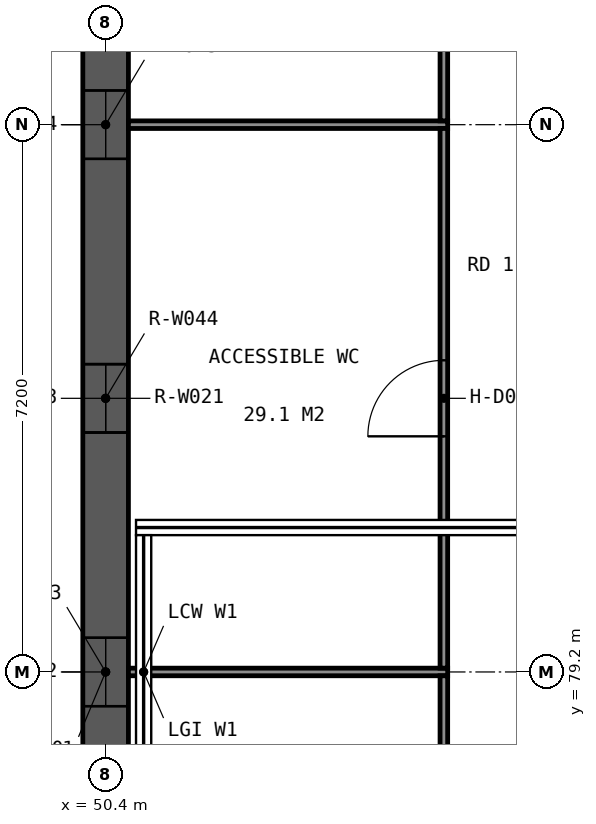
"""IFC4 building model, lengths in metres.
Left out: names, types, materials, properties, quantities, classifications, styles, units other than length and angle.
Written with IfcOpenShell. Run it as: python <this file> out.ifc"""

import sys

from ifc_helpers import new_model, si_unit, direction, frame, frame_2d, origin, place, context, subcontext, project, spatial, polyline, rectangle, outline, extrude, element, fill, save


model = new_model("IFC4")
c1 = context("Model", 3, precision=1e-05, world=origin(), true_north=direction((0.0, 1.0)))
c2 = subcontext(c1, "Body", "Model", "MODEL_VIEW")
j1 = project(units=[si_unit("LENGTHUNIT", "METRE"), si_unit("PLANEANGLEUNIT", "RADIAN")], contexts=[c1])
p1 = place(None, origin())
s1 = spatial("IfcSite", under=j1, at=p1, CompositionType="ELEMENT")
p2 = place(p1, origin())
s2 = spatial("IfcBuilding", under=s1, at=p2, CompositionType="ELEMENT")
p3 = place(p2, frame((0.0, 0.0, 9.6)))
s3 = spatial("IfcBuildingStorey", under=s2, at=p3, CompositionType="ELEMENT", Elevation=9.6)
p4 = place(p3, frame((50.4, 52.2, 0.0), z_axis=(0.0, 0.0, 1.0), x_axis=(0.0, 1.0, 0.0)))
e1 = element("IfcWall", 1, at=p4, inside=s3, PredefinedType="SOLIDWALL", context=c2, shape_type="SweptSolid", body=[
    extrude(outline(polyline([(0.0, 0.0), (54.0, 0.0), (54.0, 6.409), (53.7, 6.509), (53.4, 6.609), (53.1, 6.709), (52.8, 6.809), (52.5, 6.909), (52.2, 7.009), (51.9, 7.109), (51.6, 7.209), (51.3, 7.309), (51.0, 7.409), (50.764, 7.488), (50.762, 7.489), (50.7, 7.509), (50.4, 7.609), (50.1, 7.709), (49.8, 7.809), (49.5, 7.909), (49.2, 8.009), (48.9, 8.109), (48.6, 8.209), (48.3, 8.309), (48.0, 8.409), (47.7, 8.509), (47.4, 8.609), (47.1, 8.709), (46.8, 8.809), (46.5, 8.909), (46.2, 9.009), (46.027, 9.067), (46.025, 9.068), (45.964, 9.088), (45.962, 9.3), (45.9, 9.32), (45.6, 9.42), (45.3, 9.52), (45.0, 9.62), (44.7, 9.72), (44.4, 9.82), (44.1, 9.92), (43.8, 10.02), (43.5, 10.12), (43.2, 10.22), (42.9, 10.32), (42.6, 10.42), (42.3, 10.52), (42.0, 10.62), (41.7, 10.72), (41.4, 10.82), (41.227, 10.878), (41.225, 10.878), (41.1, 10.92), (40.8, 11.02), (40.5, 11.12), (40.2, 11.22), (39.9, 11.32), (39.6, 11.42), (39.3, 11.52), (39.0, 11.62), (38.7, 11.72), (38.4, 11.82), (38.1, 11.92), (37.8, 12.02), (37.5, 12.12), (37.2, 12.22), (36.9, 12.32), (36.6, 12.42), (36.49, 12.457), (36.488, 12.458), (36.427, 12.478), (36.425, 12.689), (36.3, 12.731), (36.0, 12.831), (35.7, 12.931), (35.4, 13.031), (35.1, 13.131), (34.8, 13.231), (34.5, 13.331), (34.2, 13.431), (33.9, 13.531), (33.6, 13.631), (33.3, 13.731), (33.0, 13.831), (32.7, 13.931), (32.4, 14.031), (32.1, 14.131), (31.8, 14.231), (31.69, 14.268), (31.688, 14.268), (31.5, 14.331), (31.2, 14.431), (30.9, 14.531), (30.6, 14.631), (30.3, 14.731), (30.0, 14.831), (29.7, 14.931), (29.4, 15.031), (29.1, 15.131), (28.8, 15.231), (28.5, 15.331), (28.2, 15.431), (27.9, 15.531), (27.6, 15.631), (27.3, 15.731), (27.201, 15.764), (27.199, 15.764), (27.0, 15.764), (26.801, 15.764), (26.799, 15.764), (26.7, 15.731), (26.4, 15.631), (26.1, 15.531), (25.8, 15.431), (25.5, 15.331), (25.2, 15.231), (24.9, 15.131), (24.6, 15.031), (24.3, 14.931), (24.0, 14.831), (23.7, 14.731), (23.4, 14.631), (23.1, 14.531), (22.8, 14.431), (22.5, 14.331), (22.312, 14.268), (22.31, 14.268), (22.2, 14.231), (21.9, 14.131), (21.6, 14.031), (21.3, 13.931), (21.0, 13.831), (20.7, 13.731), (20.4, 13.631), (20.1, 13.531), (19.8, 13.431), (19.5, 13.331), (19.2, 13.231), (18.9, 13.131), (18.6, 13.031), (18.3, 12.931), (18.0, 12.831), (17.7, 12.731), (17.575, 12.689), (17.573, 12.478), (17.512, 12.458), (17.51, 12.457), (17.4, 12.42), (17.1, 12.32), (16.8, 12.22), (16.5, 12.12), (16.2, 12.02), (15.9, 11.92), (15.6, 11.82), (15.3, 11.72), (15.0, 11.62), (14.7, 11.52), (14.4, 11.42), (14.1, 11.32), (13.8, 11.22), (13.5, 11.12), (13.2, 11.02), (12.9, 10.92), (12.775, 10.878), (12.773, 10.878), (12.6, 10.82), (12.3, 10.72), (12.0, 10.62), (11.7, 10.52), (11.4, 10.42), (11.1, 10.32), (10.8, 10.22), (10.5, 10.12), (10.2, 10.02), (9.9, 9.92), (9.6, 9.82), (9.3, 9.72), (9.0, 9.62), (8.7, 9.52), (8.4, 9.42), (8.1, 9.32), (8.038, 9.3), (8.036, 9.088), (7.975, 9.068), (7.973, 9.067), (7.8, 9.009), (7.5, 8.909), (7.2, 8.809), (6.9, 8.709), (6.6, 8.609), (6.3, 8.509), (6.0, 8.409), (5.7, 8.309), (5.4, 8.209), (5.1, 8.109), (4.8, 8.009), (4.5, 7.909), (4.2, 7.809), (3.9, 7.709), (3.6, 7.609), (3.3, 7.509), (3.238, 7.489), (3.236, 7.488), (3.0, 7.409), (2.7, 7.309), (2.4, 7.209), (2.1, 7.109), (1.8, 7.009), (1.5, 6.909), (1.2, 6.809), (0.9, 6.709), (0.6, 6.609), (0.3, 6.509), (0.0, 6.409), (0.0, 0.0)])), frame((0.0, 0.3, 0.0), z_axis=(0.0, -1.0, 0.0), x_axis=(1.0, 0.0, 0.0)), (0.0, 0.0, 1.0), 0.6),
])
p5 = place(p4, frame((1.35, 0.0, 0.9)))
e2 = element("IfcOpeningElement", 2, at=p5, cuts=e1, PredefinedType="OPENING", context=c2, shape_type="SweptSolid", body=[
    extrude(rectangle(XDim=0.9, YDim=3.3, at=frame_2d((0.45, 1.65))), frame((0.0, 0.31, 0.0), z_axis=(0.0, -1.0, 0.0), x_axis=(1.0, 0.0, 0.0)), (0.0, 0.0, 1.0), 0.62),
])
p6 = place(p4, frame((8.55, 0.0, 0.9)))
e3 = element("IfcOpeningElement", 3, at=p6, cuts=e1, PredefinedType="OPENING", context=c2, shape_type="SweptSolid", body=[
    extrude(rectangle(XDim=0.9, YDim=3.3, at=frame_2d((0.45, 1.65))), frame((0.0, 0.31, 0.0), z_axis=(0.0, -1.0, 0.0), x_axis=(1.0, 0.0, 0.0)), (0.0, 0.0, 1.0), 0.62),
])
p7 = place(p4, frame((15.75, 0.0, 0.9)))
e4 = element("IfcOpeningElement", 4, at=p7, cuts=e1, PredefinedType="OPENING", context=c2, shape_type="SweptSolid", body=[
    extrude(rectangle(XDim=0.9, YDim=3.3, at=frame_2d((0.45, 1.65))), frame((0.0, 0.31, 0.0), z_axis=(0.0, -1.0, 0.0), x_axis=(1.0, 0.0, 0.0)), (0.0, 0.0, 1.0), 0.62),
])
p8 = place(p4, frame((22.95, 0.0, 0.9)))
e5 = element("IfcOpeningElement", 5, at=p8, cuts=e1, PredefinedType="OPENING", context=c2, shape_type="SweptSolid", body=[
    extrude(rectangle(XDim=0.9, YDim=3.3, at=frame_2d((0.45, 1.65))), frame((0.0, 0.31, 0.0), z_axis=(0.0, -1.0, 0.0), x_axis=(1.0, 0.0, 0.0)), (0.0, 0.0, 1.0), 0.62),
])
p9 = place(p4, frame((30.15, 0.0, 0.9)))
e6 = element("IfcOpeningElement", 6, at=p9, cuts=e1, PredefinedType="OPENING", context=c2, shape_type="SweptSolid", body=[
    extrude(rectangle(XDim=0.9, YDim=3.3, at=frame_2d((0.45, 1.65))), frame((0.0, 0.31, 0.0), z_axis=(0.0, -1.0, 0.0), x_axis=(1.0, 0.0, 0.0)), (0.0, 0.0, 1.0), 0.62),
])
p10 = place(p4, frame((37.35, 0.0, 0.9)))
e7 = element("IfcOpeningElement", 7, at=p10, cuts=e1, PredefinedType="OPENING", context=c2, shape_type="SweptSolid", body=[
    extrude(rectangle(XDim=0.9, YDim=3.3, at=frame_2d((0.45, 1.65))), frame((0.0, 0.31, 0.0), z_axis=(0.0, -1.0, 0.0), x_axis=(1.0, 0.0, 0.0)), (0.0, 0.0, 1.0), 0.62),
])
p11 = place(p4, frame((44.55, 0.0, 0.9)))
e8 = element("IfcOpeningElement", 8, at=p11, cuts=e1, PredefinedType="OPENING", context=c2, shape_type="SweptSolid", body=[
    extrude(rectangle(XDim=0.9, YDim=3.3, at=frame_2d((0.45, 1.65))), frame((0.0, 0.31, 0.0), z_axis=(0.0, -1.0, 0.0), x_axis=(1.0, 0.0, 0.0)), (0.0, 0.0, 1.0), 0.62),
])
p12 = place(p4, frame((51.75, 0.0, 0.9)))
e9 = element("IfcOpeningElement", 9, at=p12, cuts=e1, PredefinedType="OPENING", context=c2, shape_type="SweptSolid", body=[
    extrude(rectangle(XDim=0.9, YDim=3.3, at=frame_2d((0.45, 1.65))), frame((0.0, 0.31, 0.0), z_axis=(0.0, -1.0, 0.0), x_axis=(1.0, 0.0, 0.0)), (0.0, 0.0, 1.0), 0.62),
])
p13 = place(p4, frame((1.35, 0.0, 4.8)))
e10 = element("IfcOpeningElement", 10, at=p13, cuts=e1, PredefinedType="OPENING", context=c2, shape_type="SweptSolid", body=[
    extrude(rectangle(XDim=0.9, YDim=1.5, at=frame_2d((0.45, 0.75))), frame((0.0, 0.31, 0.0), z_axis=(0.0, -1.0, 0.0), x_axis=(1.0, 0.0, 0.0)), (0.0, 0.0, 1.0), 0.62),
])
p14 = place(p4, frame((4.95, 0.0, 4.8)))
e11 = element("IfcOpeningElement", 11, at=p14, cuts=e1, PredefinedType="OPENING", context=c2, shape_type="SweptSolid", body=[
    extrude(rectangle(XDim=0.9, YDim=2.4, at=frame_2d((0.45, 1.2))), frame((0.0, 0.31, 0.0), z_axis=(0.0, -1.0, 0.0), x_axis=(1.0, 0.0, 0.0)), (0.0, 0.0, 1.0), 0.62),
])
p15 = place(p4, frame((8.55, 0.0, 4.8)))
e12 = element("IfcOpeningElement", 12, at=p15, cuts=e1, PredefinedType="OPENING", context=c2, shape_type="SweptSolid", body=[
    extrude(rectangle(XDim=0.9, YDim=3.3, at=frame_2d((0.45, 1.65))), frame((0.0, 0.31, 0.0), z_axis=(0.0, -1.0, 0.0), x_axis=(1.0, 0.0, 0.0)), (0.0, 0.0, 1.0), 0.62),
])
p16 = place(p4, frame((12.15, 0.0, 4.8)))
e13 = element("IfcOpeningElement", 13, at=p16, cuts=e1, PredefinedType="OPENING", context=c2, shape_type="SweptSolid", body=[
    extrude(rectangle(XDim=0.9, YDim=4.2, at=frame_2d((0.45, 2.1))), frame((0.0, 0.31, 0.0), z_axis=(0.0, -1.0, 0.0), x_axis=(1.0, 0.0, 0.0)), (0.0, 0.0, 1.0), 0.62),
])
p17 = place(p4, frame((15.75, 0.0, 4.8)))
e14 = element("IfcOpeningElement", 14, at=p17, cuts=e1, PredefinedType="OPENING", context=c2, shape_type="SweptSolid", body=[
    extrude(rectangle(XDim=0.9, YDim=4.2, at=frame_2d((0.45, 2.1))), frame((0.0, 0.31, 0.0), z_axis=(0.0, -1.0, 0.0), x_axis=(1.0, 0.0, 0.0)), (0.0, 0.0, 1.0), 0.62),
])
p18 = place(p4, frame((19.35, 0.0, 4.8)))
e15 = element("IfcOpeningElement", 15, at=p18, cuts=e1, PredefinedType="OPENING", context=c2, shape_type="SweptSolid", body=[
    extrude(rectangle(XDim=0.9, YDim=4.2, at=frame_2d((0.45, 2.1))), frame((0.0, 0.31, 0.0), z_axis=(0.0, -1.0, 0.0), x_axis=(1.0, 0.0, 0.0)), (0.0, 0.0, 1.0), 0.62),
])
p19 = place(p4, frame((22.95, 0.0, 4.8)))
e16 = element("IfcOpeningElement", 16, at=p19, cuts=e1, PredefinedType="OPENING", context=c2, shape_type="SweptSolid", body=[
    extrude(rectangle(XDim=0.9, YDim=4.2, at=frame_2d((0.45, 2.1))), frame((0.0, 0.31, 0.0), z_axis=(0.0, -1.0, 0.0), x_axis=(1.0, 0.0, 0.0)), (0.0, 0.0, 1.0), 0.62),
])
p20 = place(p4, frame((26.55, 0.0, 4.8)))
e17 = element("IfcOpeningElement", 17, at=p20, cuts=e1, PredefinedType="OPENING", context=c2, shape_type="SweptSolid", body=[
    extrude(rectangle(XDim=0.9, YDim=4.2, at=frame_2d((0.45, 2.1))), frame((0.0, 0.31, 0.0), z_axis=(0.0, -1.0, 0.0), x_axis=(1.0, 0.0, 0.0)), (0.0, 0.0, 1.0), 0.62),
])
p21 = place(p4, frame((30.15, 0.0, 4.8)))
e18 = element("IfcOpeningElement", 18, at=p21, cuts=e1, PredefinedType="OPENING", context=c2, shape_type="SweptSolid", body=[
    extrude(rectangle(XDim=0.9, YDim=4.2, at=frame_2d((0.45, 2.1))), frame((0.0, 0.31, 0.0), z_axis=(0.0, -1.0, 0.0), x_axis=(1.0, 0.0, 0.0)), (0.0, 0.0, 1.0), 0.62),
])
p22 = place(p4, frame((33.75, 0.0, 4.8)))
e19 = element("IfcOpeningElement", 19, at=p22, cuts=e1, PredefinedType="OPENING", context=c2, shape_type="SweptSolid", body=[
    extrude(rectangle(XDim=0.9, YDim=4.2, at=frame_2d((0.45, 2.1))), frame((0.0, 0.31, 0.0), z_axis=(0.0, -1.0, 0.0), x_axis=(1.0, 0.0, 0.0)), (0.0, 0.0, 1.0), 0.62),
])
p23 = place(p4, frame((37.35, 0.0, 4.8)))
e20 = element("IfcOpeningElement", 20, at=p23, cuts=e1, PredefinedType="OPENING", context=c2, shape_type="SweptSolid", body=[
    extrude(rectangle(XDim=0.9, YDim=4.2, at=frame_2d((0.45, 2.1))), frame((0.0, 0.31, 0.0), z_axis=(0.0, -1.0, 0.0), x_axis=(1.0, 0.0, 0.0)), (0.0, 0.0, 1.0), 0.62),
])
p24 = place(p4, frame((40.95, 0.0, 4.8)))
e21 = element("IfcOpeningElement", 21, at=p24, cuts=e1, PredefinedType="OPENING", context=c2, shape_type="SweptSolid", body=[
    extrude(rectangle(XDim=0.9, YDim=4.2, at=frame_2d((0.45, 2.1))), frame((0.0, 0.31, 0.0), z_axis=(0.0, -1.0, 0.0), x_axis=(1.0, 0.0, 0.0)), (0.0, 0.0, 1.0), 0.62),
])
p25 = place(p4, frame((44.55, 0.0, 4.8)))
e22 = element("IfcOpeningElement", 22, at=p25, cuts=e1, PredefinedType="OPENING", context=c2, shape_type="SweptSolid", body=[
    extrude(rectangle(XDim=0.9, YDim=3.3, at=frame_2d((0.45, 1.65))), frame((0.0, 0.31, 0.0), z_axis=(0.0, -1.0, 0.0), x_axis=(1.0, 0.0, 0.0)), (0.0, 0.0, 1.0), 0.62),
])
p26 = place(p4, frame((48.15, 0.0, 4.8)))
e23 = element("IfcOpeningElement", 23, at=p26, cuts=e1, PredefinedType="OPENING", context=c2, shape_type="SweptSolid", body=[
    extrude(rectangle(XDim=0.9, YDim=2.4, at=frame_2d((0.45, 1.2))), frame((0.0, 0.31, 0.0), z_axis=(0.0, -1.0, 0.0), x_axis=(1.0, 0.0, 0.0)), (0.0, 0.0, 1.0), 0.62),
])
p27 = place(p4, frame((51.75, 0.0, 4.8)))
e24 = element("IfcOpeningElement", 24, at=p27, cuts=e1, PredefinedType="OPENING", context=c2, shape_type="SweptSolid", body=[
    extrude(rectangle(XDim=0.9, YDim=1.5, at=frame_2d((0.45, 0.75))), frame((0.0, 0.31, 0.0), z_axis=(0.0, -1.0, 0.0), x_axis=(1.0, 0.0, 0.0)), (0.0, 0.0, 1.0), 0.62),
])
p28 = place(p4, frame((15.75, 0.0, 9.6)))
e25 = element("IfcOpeningElement", 25, at=p28, cuts=e1, PredefinedType="OPENING", context=c2, shape_type="SweptSolid", body=[
    extrude(rectangle(XDim=0.9, YDim=1.5, at=frame_2d((0.45, 0.75))), frame((0.0, 0.31, 0.0), z_axis=(0.0, -1.0, 0.0), x_axis=(1.0, 0.0, 0.0)), (0.0, 0.0, 1.0), 0.62),
])
p29 = place(p4, frame((19.35, 0.0, 9.6)))
e26 = element("IfcOpeningElement", 26, at=p29, cuts=e1, PredefinedType="OPENING", context=c2, shape_type="SweptSolid", body=[
    extrude(rectangle(XDim=0.9, YDim=2.4, at=frame_2d((0.45, 1.2))), frame((0.0, 0.31, 0.0), z_axis=(0.0, -1.0, 0.0), x_axis=(1.0, 0.0, 0.0)), (0.0, 0.0, 1.0), 0.62),
])
p30 = place(p4, frame((22.95, 0.0, 9.6)))
e27 = element("IfcOpeningElement", 27, at=p30, cuts=e1, PredefinedType="OPENING", context=c2, shape_type="SweptSolid", body=[
    extrude(rectangle(XDim=0.9, YDim=4.2, at=frame_2d((0.45, 2.1))), frame((0.0, 0.31, 0.0), z_axis=(0.0, -1.0, 0.0), x_axis=(1.0, 0.0, 0.0)), (0.0, 0.0, 1.0), 0.62),
])
p31 = place(p4, frame((26.55, 0.0, 9.6)))
e28 = element("IfcOpeningElement", 28, at=p31, cuts=e1, PredefinedType="OPENING", context=c2, shape_type="SweptSolid", body=[
    extrude(rectangle(XDim=0.9, YDim=4.2, at=frame_2d((0.45, 2.1))), frame((0.0, 0.31, 0.0), z_axis=(0.0, -1.0, 0.0), x_axis=(1.0, 0.0, 0.0)), (0.0, 0.0, 1.0), 0.62),
])
p32 = place(p4, frame((30.15, 0.0, 9.6)))
e29 = element("IfcOpeningElement", 29, at=p32, cuts=e1, PredefinedType="OPENING", context=c2, shape_type="SweptSolid", body=[
    extrude(rectangle(XDim=0.9, YDim=4.2, at=frame_2d((0.45, 2.1))), frame((0.0, 0.31, 0.0), z_axis=(0.0, -1.0, 0.0), x_axis=(1.0, 0.0, 0.0)), (0.0, 0.0, 1.0), 0.62),
])
p33 = place(p4, frame((33.75, 0.0, 9.6)))
e30 = element("IfcOpeningElement", 30, at=p33, cuts=e1, PredefinedType="OPENING", context=c2, shape_type="SweptSolid", body=[
    extrude(rectangle(XDim=0.9, YDim=2.4, at=frame_2d((0.45, 1.2))), frame((0.0, 0.31, 0.0), z_axis=(0.0, -1.0, 0.0), x_axis=(1.0, 0.0, 0.0)), (0.0, 0.0, 1.0), 0.62),
])
p34 = place(p4, frame((37.35, 0.0, 9.6)))
e31 = element("IfcOpeningElement", 31, at=p34, cuts=e1, PredefinedType="OPENING", context=c2, shape_type="SweptSolid", body=[
    extrude(rectangle(XDim=0.9, YDim=1.5, at=frame_2d((0.45, 0.75))), frame((0.0, 0.31, 0.0), z_axis=(0.0, -1.0, 0.0), x_axis=(1.0, 0.0, 0.0)), (0.0, 0.0, 1.0), 0.62),
])
for number, where, z_axis, x_axis in (
    (32, (50.7, 79.2, 0.0), (0.0, 0.0, 1.0), (1.0, 0.0, 0.0)),
    (33, (50.7, 86.4, 0.0), (0.0, 0.0, 1.0), (1.0, 0.0, 0.0)),
):
    element("IfcWall", number, at=place(p3, frame(where, z_axis=z_axis, x_axis=x_axis)), inside=s3, PredefinedType="PARTITIONING", context=c2, shape_type="SweptSolid", body=[
        extrude(rectangle(XDim=4.2, YDim=0.1, at=frame_2d((2.1, 0.0))), origin(), (0.0, 0.0, 1.0), 4.7),
    ])
p35 = place(p3, frame((54.85, 72.05, 0.0), z_axis=(0.0, 0.0, 1.0), x_axis=(0.0, 1.0, 0.0)))
e34 = element("IfcWall", 34, at=p35, inside=s3, PredefinedType="PARTITIONING", context=c2, shape_type="SweptSolid", body=[
    extrude(rectangle(XDim=7.1, YDim=0.1, at=frame_2d((3.55, 0.0))), origin(), (0.0, 0.0, 1.0), 4.7),
])
p36 = place(p35, frame((3.1, 0.0, 0.0)))
e35 = element("IfcOpeningElement", 35, at=p36, cuts=e34, PredefinedType="OPENING", context=c2, shape_type="SweptSolid", body=[
    extrude(rectangle(XDim=0.9, YDim=2.1, at=frame_2d((0.45, 1.05))), frame((0.0, 0.06, 0.0), z_axis=(0.0, -1.0, 0.0), x_axis=(1.0, 0.0, 0.0)), (0.0, 0.0, 1.0), 0.12),
])
p37 = place(p3, frame((54.85, 79.25, 0.0), z_axis=(0.0, 0.0, 1.0), x_axis=(0.0, 1.0, 0.0)))
e36 = element("IfcWall", 36, at=p37, inside=s3, PredefinedType="PARTITIONING", context=c2, shape_type="SweptSolid", body=[
    extrude(rectangle(XDim=7.1, YDim=0.1, at=frame_2d((3.55, 0.0))), origin(), (0.0, 0.0, 1.0), 4.7),
])
p38 = place(p37, frame((3.05, 0.0, 0.0)))
e37 = element("IfcOpeningElement", 37, at=p38, cuts=e36, PredefinedType="OPENING", context=c2, shape_type="SweptSolid", body=[
    extrude(rectangle(XDim=1.0, YDim=2.1, at=frame_2d((0.5, 1.05))), frame((0.0, 0.06, 0.0), z_axis=(0.0, -1.0, 0.0), x_axis=(1.0, 0.0, 0.0)), (0.0, 0.0, 1.0), 0.12),
])
p39 = place(p3, frame((54.85, 86.45, 0.0), z_axis=(0.0, 0.0, 1.0), x_axis=(0.0, 1.0, 0.0)))
e38 = element("IfcWall", 38, at=p39, inside=s3, PredefinedType="PARTITIONING", context=c2, shape_type="SweptSolid", body=[
    extrude(rectangle(XDim=7.1, YDim=0.1, at=frame_2d((3.55, 0.0))), origin(), (0.0, 0.0, 1.0), 4.7),
])
p40 = place(p39, frame((2.65, 0.0, 0.0)))
e39 = element("IfcOpeningElement", 39, at=p40, cuts=e38, PredefinedType="OPENING", context=c2, shape_type="SweptSolid", body=[
    extrude(rectangle(XDim=1.8, YDim=2.1, at=frame_2d((0.9, 1.05))), frame((0.0, 0.06, 0.0), z_axis=(0.0, -1.0, 0.0), x_axis=(1.0, 0.0, 0.0)), (0.0, 0.0, 1.0), 0.12),
])
p41 = place(p9, origin())
e40 = element("IfcWindow", 40, at=p41, inside=s3, PartitioningType="SINGLE_PANEL", PredefinedType="WINDOW", context=c2, shape_type="SweptSolid", body=[
    extrude(rectangle(XDim=0.9, YDim=3.3, at=frame_2d((0.45, 1.65))), frame((0.0, 0.03, 0.0), z_axis=(0.0, -1.0, 0.0), x_axis=(1.0, 0.0, 0.0)), (0.0, 0.0, 1.0), 0.06),
])
fill(e6, e40)
p42 = place(p20, origin())
e41 = element("IfcWindow", 41, at=p42, inside=s3, PartitioningType="SINGLE_PANEL", PredefinedType="WINDOW", context=c2, shape_type="SweptSolid", body=[
    extrude(rectangle(XDim=0.9, YDim=4.2, at=frame_2d((0.45, 2.1))), frame((0.0, 0.03, 0.0), z_axis=(0.0, -1.0, 0.0), x_axis=(1.0, 0.0, 0.0)), (0.0, 0.0, 1.0), 0.06),
])
fill(e17, e41)
p43 = place(p21, origin())
e42 = element("IfcWindow", 42, at=p43, inside=s3, PartitioningType="SINGLE_PANEL", PredefinedType="WINDOW", context=c2, shape_type="SweptSolid", body=[
    extrude(rectangle(XDim=0.9, YDim=4.2, at=frame_2d((0.45, 2.1))), frame((0.0, 0.03, 0.0), z_axis=(0.0, -1.0, 0.0), x_axis=(1.0, 0.0, 0.0)), (0.0, 0.0, 1.0), 0.06),
])
fill(e18, e42)
p44 = place(p22, origin())
e43 = element("IfcWindow", 43, at=p44, inside=s3, PartitioningType="SINGLE_PANEL", PredefinedType="WINDOW", context=c2, shape_type="SweptSolid", body=[
    extrude(rectangle(XDim=0.9, YDim=4.2, at=frame_2d((0.45, 2.1))), frame((0.0, 0.03, 0.0), z_axis=(0.0, -1.0, 0.0), x_axis=(1.0, 0.0, 0.0)), (0.0, 0.0, 1.0), 0.06),
])
fill(e19, e43)
p45 = place(p31, origin())
e44 = element("IfcWindow", 44, at=p45, inside=s3, PartitioningType="SINGLE_PANEL", PredefinedType="WINDOW", context=c2, shape_type="SweptSolid", body=[
    extrude(rectangle(XDim=0.9, YDim=4.2, at=frame_2d((0.45, 2.1))), frame((0.0, 0.03, 0.0), z_axis=(0.0, -1.0, 0.0), x_axis=(1.0, 0.0, 0.0)), (0.0, 0.0, 1.0), 0.06),
])
fill(e28, e44)
p46 = place(p32, origin())
e45 = element("IfcWindow", 45, at=p46, inside=s3, PartitioningType="SINGLE_PANEL", PredefinedType="WINDOW", context=c2, shape_type="SweptSolid", body=[
    extrude(rectangle(XDim=0.9, YDim=4.2, at=frame_2d((0.45, 2.1))), frame((0.0, 0.03, 0.0), z_axis=(0.0, -1.0, 0.0), x_axis=(1.0, 0.0, 0.0)), (0.0, 0.0, 1.0), 0.06),
])
fill(e29, e45)
p47 = place(p33, origin())
e46 = element("IfcWindow", 46, at=p47, inside=s3, PartitioningType="SINGLE_PANEL", PredefinedType="WINDOW", context=c2, shape_type="SweptSolid", body=[
    extrude(rectangle(XDim=0.9, YDim=2.4, at=frame_2d((0.45, 1.2))), frame((0.0, 0.03, 0.0), z_axis=(0.0, -1.0, 0.0), x_axis=(1.0, 0.0, 0.0)), (0.0, 0.0, 1.0), 0.06),
])
fill(e30, e46)
p48 = place(p38, origin())
e47 = element("IfcDoor", 47, at=p48, inside=s3, OperationType="SINGLE_SWING_LEFT", PredefinedType="DOOR", context=c2, shape_type="SweptSolid", body=[
    extrude(rectangle(XDim=1.0, YDim=2.1, at=frame_2d((0.5, 1.05))), frame((0.0, 0.025, 0.0), z_axis=(0.0, -1.0, 0.0), x_axis=(1.0, 0.0, 0.0)), (0.0, 0.0, 1.0), 0.05),
])
fill(e37, e47)
save(model, sys.argv[1])
